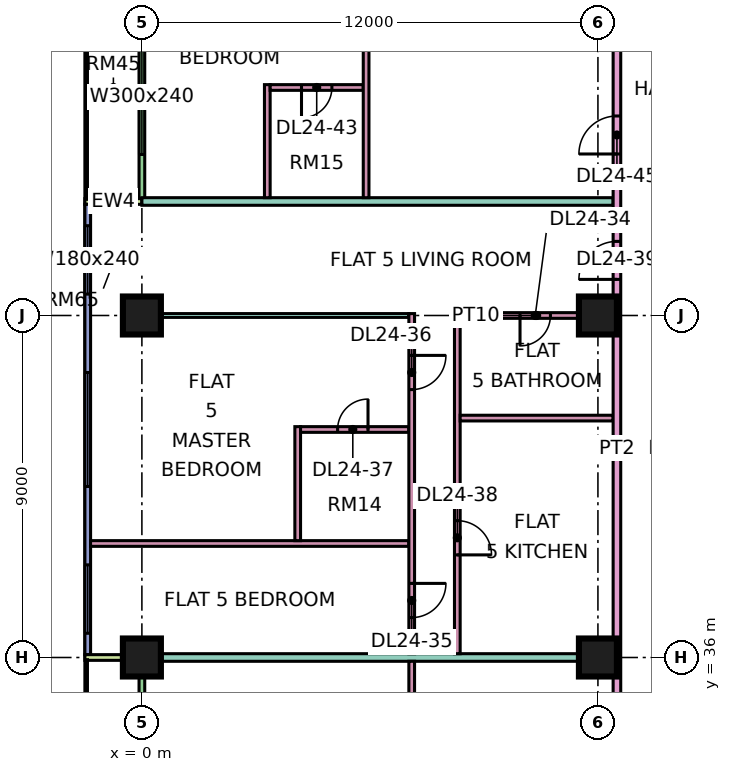
"""IFC4 building model, lengths in metres.
Left out: names, types, materials, properties, quantities, classifications, styles, units other than length and angle.
Written with IfcOpenShell. Run it as: python <this file> out.ifc"""

import sys

from ifc_helpers import new_model, si_unit, direction, frame, frame_2d, origin, origin_2d, place, context, subcontext, project, spatial, rectangle, extrude, element, fill, save


model = new_model("IFC4")
c1 = context("Model", 3, precision=1e-05, world=origin(), true_north=direction((0.0, 1.0)))
c2 = subcontext(c1, "Body", "Model", "MODEL_VIEW")
j1 = project(units=[si_unit("LENGTHUNIT", "METRE"), si_unit("PLANEANGLEUNIT", "RADIAN")], contexts=[c1])
p1 = place(None, origin())
s1 = spatial("IfcSite", under=j1, at=p1, CompositionType="ELEMENT")
p2 = place(p1, origin())
s2 = spatial("IfcBuilding", under=s1, at=p2, CompositionType="ELEMENT")
p3 = place(p2, frame((0.0, 0.0, 106.9)))
s3 = spatial("IfcBuildingStorey", under=s2, at=p3, CompositionType="ELEMENT", Elevation=106.9)
p4 = place(p3, frame((0.0, 36.0, 0.0), z_axis=(0.0, 0.0, 1.0), x_axis=(1.0, 0.0, 0.0)))
e1 = element("IfcColumn", 1, at=p4, inside=s3, PredefinedType="COLUMN", context=c2, shape_type="SweptSolid", body=[
    extrude(rectangle(XDim=1.0, YDim=1.0, at=origin_2d()), origin(), (0.0, 0.0, 1.0), 3.75),
])
p5 = place(p3, frame((0.0, 45.0, 0.0), z_axis=(0.0, 0.0, 1.0), x_axis=(1.0, 0.0, 0.0)))
e2 = element("IfcColumn", 2, at=p5, inside=s3, PredefinedType="COLUMN", context=c2, shape_type="SweptSolid", body=[
    extrude(rectangle(XDim=1.0, YDim=1.0, at=origin_2d()), origin(), (0.0, 0.0, 1.0), 3.75),
])
for number, where, z_axis, x_axis in (
    (3, (12.0, 36.0, 0.0), (0.0, 0.0, 1.0), (1.0, 0.0, 0.0)),
    (4, (12.0, 45.0, 0.0), (0.0, 0.0, 1.0), (1.0, 0.0, 0.0)),
):
    element("IfcColumn", number, at=place(p3, frame(where, z_axis=z_axis, x_axis=x_axis)), inside=s3, PredefinedType="COLUMN", context=c2, shape_type="SweptSolid", body=[
        extrude(rectangle(XDim=1.0, YDim=1.0, at=origin_2d()), origin(), (0.0, 0.0, 1.0), 3.75),
    ])
p6 = place(p3, frame((0.0, 61.425, 0.0), z_axis=(0.0, 0.0, 1.0), x_axis=(0.0, -1.0, 0.0)))
e5 = element("IfcWall", 5, at=p6, inside=s3, PredefinedType="SOLIDWALL", context=c2, shape_type="SweptSolid", body=[
    extrude(rectangle(XDim=13.35, YDim=0.15, at=frame_2d((6.675, 0.0))), origin(), (0.0, 0.0, 1.0), 3.35),
])
p7 = place(p6, frame((0.262, 0.0, 0.45)))
e6 = element("IfcOpeningElement", 6, at=p7, cuts=e5, PredefinedType="OPENING", context=c2, shape_type="SweptSolid", body=[
    extrude(rectangle(XDim=0.9, YDim=2.4, at=frame_2d((0.45, 1.2))), frame((0.0, 0.085, 0.0), z_axis=(0.0, -1.0, 0.0), x_axis=(1.0, 0.0, 0.0)), (0.0, 0.0, 1.0), 0.17),
])
p8 = place(p6, frame((3.225, 0.0, 0.0)))
e7 = element("IfcOpeningElement", 7, at=p8, cuts=e5, PredefinedType="OPENING", context=c2, shape_type="SweptSolid", body=[
    extrude(rectangle(XDim=1.8, YDim=2.4, at=frame_2d((0.9, 1.2))), frame((0.0, 0.085, 0.0), z_axis=(0.0, -1.0, 0.0), x_axis=(1.0, 0.0, 0.0)), (0.0, 0.0, 1.0), 0.17),
])
p9 = place(p6, frame((9.188, 0.0, 0.45)))
e8 = element("IfcOpeningElement", 8, at=p9, cuts=e5, PredefinedType="OPENING", context=c2, shape_type="SweptSolid", body=[
    extrude(rectangle(XDim=3.0, YDim=2.4, at=frame_2d((1.5, 1.2))), frame((0.0, 0.085, 0.0), z_axis=(0.0, -1.0, 0.0), x_axis=(1.0, 0.0, 0.0)), (0.0, 0.0, 1.0), 0.17),
])
p10 = place(p3, frame((-1.5, 48.0, 0.0), z_axis=(0.0, 0.0, 1.0), x_axis=(1.0, 0.0, 0.0)))
e9 = element("IfcWall", 9, at=p10, inside=s3, PredefinedType="SOLIDWALL", context=c2, shape_type="SweptSolid", body=[
    extrude(rectangle(XDim=1.5, YDim=0.15, at=frame_2d((0.75, 0.0))), origin(), (0.0, 0.0, 1.0), 3.35),
])
p11 = place(p3, frame((-1.425, 47.925, 0.0), z_axis=(0.0, 0.0, 1.0), x_axis=(0.0, -1.0, 0.0)))
e10 = element("IfcWall", 10, at=p11, inside=s3, PredefinedType="SOLIDWALL", context=c2, shape_type="SweptSolid", body=[
    extrude(rectangle(XDim=11.85, YDim=0.15, at=frame_2d((5.925, 0.0))), origin(), (0.0, 0.0, 1.0), 3.35),
])
p12 = place(p11, frame((0.562, 0.0, 0.45)))
e11 = element("IfcOpeningElement", 11, at=p12, cuts=e10, PredefinedType="OPENING", context=c2, shape_type="SweptSolid", body=[
    extrude(rectangle(XDim=1.8, YDim=2.4, at=frame_2d((0.9, 1.2))), frame((0.0, 0.085, 0.0), z_axis=(0.0, -1.0, 0.0), x_axis=(1.0, 0.0, 0.0)), (0.0, 0.0, 1.0), 0.17),
])
p13 = place(p11, frame((4.425, 0.0, 0.45)))
e12 = element("IfcOpeningElement", 12, at=p13, cuts=e10, PredefinedType="OPENING", context=c2, shape_type="SweptSolid", body=[
    extrude(rectangle(XDim=3.0, YDim=2.4, at=frame_2d((1.5, 1.2))), frame((0.0, 0.085, 0.0), z_axis=(0.0, -1.0, 0.0), x_axis=(1.0, 0.0, 0.0)), (0.0, 0.0, 1.0), 0.17),
])
p14 = place(p11, frame((9.488, 0.0, 0.45)))
e13 = element("IfcOpeningElement", 13, at=p14, cuts=e10, PredefinedType="OPENING", context=c2, shape_type="SweptSolid", body=[
    extrude(rectangle(XDim=1.8, YDim=2.4, at=frame_2d((0.9, 1.2))), frame((0.0, 0.085, 0.0), z_axis=(0.0, -1.0, 0.0), x_axis=(1.0, 0.0, 0.0)), (0.0, 0.0, 1.0), 0.17),
])
p15 = place(p3, frame((0.0, 35.925, 0.0), z_axis=(0.0, 0.0, 1.0), x_axis=(0.0, -1.0, 0.0)))
e14 = element("IfcWall", 14, at=p15, inside=s3, PredefinedType="SOLIDWALL", context=c2, shape_type="SweptSolid", body=[
    extrude(rectangle(XDim=11.85, YDim=0.15, at=frame_2d((5.925, 0.0))), origin(), (0.0, 0.0, 1.0), 3.35),
])
p16 = place(p15, frame((2.325, 0.0, 0.0)))
e15 = element("IfcOpeningElement", 15, at=p16, cuts=e14, PredefinedType="OPENING", context=c2, shape_type="SweptSolid", body=[
    extrude(rectangle(XDim=1.8, YDim=2.4, at=frame_2d((0.9, 1.2))), frame((0.0, 0.085, 0.0), z_axis=(0.0, -1.0, 0.0), x_axis=(1.0, 0.0, 0.0)), (0.0, 0.0, 1.0), 0.17),
])
p17 = place(p15, frame((7.125, 0.0, 0.45)))
e16 = element("IfcOpeningElement", 16, at=p17, cuts=e14, PredefinedType="OPENING", context=c2, shape_type="SweptSolid", body=[
    extrude(rectangle(XDim=3.0, YDim=2.4, at=frame_2d((1.5, 1.2))), frame((0.0, 0.085, 0.0), z_axis=(0.0, -1.0, 0.0), x_axis=(1.0, 0.0, 0.0)), (0.0, 0.0, 1.0), 0.17),
])
p18 = place(p3, frame((-1.5, 36.0, 0.0), z_axis=(0.0, 0.0, 1.0), x_axis=(1.0, 0.0, 0.0)))
e17 = element("IfcWall", 17, at=p18, inside=s3, PredefinedType="SOLIDWALL", context=c2, shape_type="SweptSolid", body=[
    extrude(rectangle(XDim=1.5, YDim=0.15, at=frame_2d((0.75, 0.0))), origin(), (0.0, 0.0, 1.0), 3.35),
])
p19 = place(p3, frame((-1.351, 39.0, 0.0), z_axis=(0.0, 0.0, 1.0), x_axis=(1.0, 0.0, 0.0)))
e18 = element("IfcWall", 18, at=p19, inside=s3, PredefinedType="PARTITIONING", context=c2, shape_type="SweptSolid", body=[
    extrude(rectangle(XDim=8.376, YDim=0.15, at=frame_2d((4.188, 0.0))), origin(), (0.0, 0.0, 1.0), 3.35),
])
e19 = element("IfcWall", 19, at=p4, inside=s3, PredefinedType="PARTITIONING", context=c2, shape_type="SweptSolid", body=[
    extrude(rectangle(XDim=12.4, YDim=0.2, at=frame_2d((6.2, 0.0))), origin(), (0.0, 0.0, 1.0), 3.35),
])
e20 = element("IfcWall", 20, at=p5, inside=s3, PredefinedType="PARTITIONING", context=c2, shape_type="SweptSolid", body=[
    extrude(rectangle(XDim=7.025, YDim=0.1, at=frame_2d((3.512, 0.0))), origin(), (0.0, 0.0, 1.0), 3.35),
])
p20 = place(p3, frame((0.0, 48.0, 0.0), z_axis=(0.0, 0.0, 1.0), x_axis=(1.0, 0.0, 0.0)))
e21 = element("IfcWall", 21, at=p20, inside=s3, PredefinedType="PARTITIONING", context=c2, shape_type="SweptSolid", body=[
    extrude(rectangle(XDim=12.4, YDim=0.2, at=frame_2d((6.2, 0.0))), origin(), (0.0, 0.0, 1.0), 3.35),
])
p21 = place(p3, frame((3.3, 48.1, 0.0), z_axis=(0.0, 0.0, 1.0), x_axis=(0.0, 1.0, 0.0)))
e22 = element("IfcWall", 22, at=p21, inside=s3, PredefinedType="PARTITIONING", context=c2, shape_type="SweptSolid", body=[
    extrude(rectangle(XDim=2.975, YDim=0.15, at=frame_2d((1.487, 0.0))), origin(), (0.0, 0.0, 1.0), 3.35),
])
p22 = place(p3, frame((3.375, 51.0, 0.0), z_axis=(0.0, 0.0, 1.0), x_axis=(1.0, 0.0, 0.0)))
e23 = element("IfcWall", 23, at=p22, inside=s3, PredefinedType="PARTITIONING", context=c2, shape_type="SweptSolid", body=[
    extrude(rectangle(XDim=2.45, YDim=0.15, at=frame_2d((1.225, 0.0))), origin(), (0.0, 0.0, 1.0), 3.35),
])
p23 = place(p22, frame((0.825, 0.0, 0.0)))
e24 = element("IfcOpeningElement", 24, at=p23, cuts=e23, PredefinedType="OPENING", context=c2, shape_type="SweptSolid", body=[
    extrude(rectangle(XDim=0.8, YDim=2.1, at=frame_2d((0.4, 1.05))), frame((0.0, 0.085, 0.0), z_axis=(0.0, -1.0, 0.0), x_axis=(1.0, 0.0, 0.0)), (0.0, 0.0, 1.0), 0.17),
])
p24 = place(p3, frame((4.1, 39.075, 0.0), z_axis=(0.0, 0.0, 1.0), x_axis=(0.0, 1.0, 0.0)))
e25 = element("IfcWall", 25, at=p24, inside=s3, PredefinedType="PARTITIONING", context=c2, shape_type="SweptSolid", body=[
    extrude(rectangle(XDim=3.0, YDim=0.15, at=frame_2d((1.5, 0.0))), origin(), (0.0, 0.0, 1.0), 3.35),
])
p25 = place(p3, frame((4.175, 42.0, 0.0), z_axis=(0.0, 0.0, 1.0), x_axis=(1.0, 0.0, 0.0)))
e26 = element("IfcWall", 26, at=p25, inside=s3, PredefinedType="PARTITIONING", context=c2, shape_type="SweptSolid", body=[
    extrude(rectangle(XDim=2.85, YDim=0.15, at=frame_2d((1.425, 0.0))), origin(), (0.0, 0.0, 1.0), 3.35),
])
p26 = place(p25, frame((0.975, 0.0, 0.0)))
e27 = element("IfcOpeningElement", 27, at=p26, cuts=e26, PredefinedType="OPENING", context=c2, shape_type="SweptSolid", body=[
    extrude(rectangle(XDim=0.8, YDim=2.1, at=frame_2d((0.4, 1.05))), frame((0.0, 0.085, 0.0), z_axis=(0.0, -1.0, 0.0), x_axis=(1.0, 0.0, 0.0)), (0.0, 0.0, 1.0), 0.17),
])
p27 = place(p3, frame((5.9, 48.1, 0.0), z_axis=(0.0, 0.0, 1.0), x_axis=(0.0, 1.0, 0.0)))
e28 = element("IfcWall", 28, at=p27, inside=s3, PredefinedType="PARTITIONING", context=c2, shape_type="SweptSolid", body=[
    extrude(rectangle(XDim=5.95, YDim=0.15, at=frame_2d((2.975, 0.0))), origin(), (0.0, 0.0, 1.0), 3.35),
])
p28 = place(p27, frame((3.95, 0.0, 0.0)))
e29 = element("IfcOpeningElement", 29, at=p28, cuts=e28, PredefinedType="OPENING", context=c2, shape_type="SweptSolid", body=[
    extrude(rectangle(XDim=0.9, YDim=2.1, at=frame_2d((0.45, 1.05))), frame((0.0, 0.085, 0.0), z_axis=(0.0, -1.0, 0.0), x_axis=(1.0, 0.0, 0.0)), (0.0, 0.0, 1.0), 0.17),
])
p29 = place(p3, frame((7.1, 26.925, 0.0), z_axis=(0.0, 0.0, 1.0), x_axis=(0.0, 1.0, 0.0)))
e30 = element("IfcWall", 30, at=p29, inside=s3, PredefinedType="PARTITIONING", context=c2, shape_type="SweptSolid", body=[
    extrude(rectangle(XDim=8.975, YDim=0.15, at=frame_2d((4.487, 0.0))), origin(), (0.0, 0.0, 1.0), 3.35),
])
p30 = place(p29, frame((1.125, 0.0, 0.0)))
e31 = element("IfcOpeningElement", 31, at=p30, cuts=e30, PredefinedType="OPENING", context=c2, shape_type="SweptSolid", body=[
    extrude(rectangle(XDim=0.8, YDim=2.1, at=frame_2d((0.4, 1.05))), frame((0.0, 0.085, 0.0), z_axis=(0.0, -1.0, 0.0), x_axis=(1.0, 0.0, 0.0)), (0.0, 0.0, 1.0), 0.17),
])
p31 = place(p29, frame((5.625, 0.0, 0.0)))
e32 = element("IfcOpeningElement", 32, at=p31, cuts=e30, PredefinedType="OPENING", context=c2, shape_type="SweptSolid", body=[
    extrude(rectangle(XDim=0.9, YDim=2.1, at=frame_2d((0.45, 1.05))), frame((0.0, 0.085, 0.0), z_axis=(0.0, -1.0, 0.0), x_axis=(1.0, 0.0, 0.0)), (0.0, 0.0, 1.0), 0.17),
])
p32 = place(p3, frame((7.1, 36.1, 0.0), z_axis=(0.0, 0.0, 1.0), x_axis=(0.0, 1.0, 0.0)))
e33 = element("IfcWall", 33, at=p32, inside=s3, PredefinedType="PARTITIONING", context=c2, shape_type="SweptSolid", body=[
    extrude(rectangle(XDim=8.95, YDim=0.15, at=frame_2d((4.475, 0.0))), origin(), (0.0, 0.0, 1.0), 3.35),
])
p33 = place(p32, frame((0.95, 0.0, 0.0)))
e34 = element("IfcOpeningElement", 34, at=p33, cuts=e33, PredefinedType="OPENING", context=c2, shape_type="SweptSolid", body=[
    extrude(rectangle(XDim=0.9, YDim=2.1, at=frame_2d((0.45, 1.05))), frame((0.0, 0.085, 0.0), z_axis=(0.0, -1.0, 0.0), x_axis=(1.0, 0.0, 0.0)), (0.0, 0.0, 1.0), 0.17),
])
p34 = place(p32, frame((6.95, 0.0, 0.0)))
e35 = element("IfcOpeningElement", 35, at=p34, cuts=e33, PredefinedType="OPENING", context=c2, shape_type="SweptSolid", body=[
    extrude(rectangle(XDim=0.9, YDim=2.1, at=frame_2d((0.45, 1.05))), frame((0.0, 0.085, 0.0), z_axis=(0.0, -1.0, 0.0), x_axis=(1.0, 0.0, 0.0)), (0.0, 0.0, 1.0), 0.17),
])
p35 = place(p3, frame((8.3, 36.1, 0.0), z_axis=(0.0, 0.0, 1.0), x_axis=(0.0, 1.0, 0.0)))
e36 = element("IfcWall", 36, at=p35, inside=s3, PredefinedType="PARTITIONING", context=c2, shape_type="SweptSolid", body=[
    extrude(rectangle(XDim=8.975, YDim=0.15, at=frame_2d((4.487, 0.0))), origin(), (0.0, 0.0, 1.0), 3.35),
])
p36 = place(p35, frame((2.6, 0.0, 0.0)))
e37 = element("IfcOpeningElement", 37, at=p36, cuts=e36, PredefinedType="OPENING", context=c2, shape_type="SweptSolid", body=[
    extrude(rectangle(XDim=0.9, YDim=2.1, at=frame_2d((0.45, 1.05))), frame((0.0, 0.085, 0.0), z_axis=(0.0, -1.0, 0.0), x_axis=(1.0, 0.0, 0.0)), (0.0, 0.0, 1.0), 0.17),
])
p37 = place(p3, frame((8.375, 42.3, 0.0), z_axis=(0.0, 0.0, 1.0), x_axis=(1.0, 0.0, 0.0)))
e38 = element("IfcWall", 38, at=p37, inside=s3, PredefinedType="PARTITIONING", context=c2, shape_type="SweptSolid", body=[
    extrude(rectangle(XDim=4.025, YDim=0.15, at=frame_2d((2.012, 0.0))), origin(), (0.0, 0.0, 1.0), 3.35),
])
p38 = place(p3, frame((8.375, 45.0, 0.0), z_axis=(0.0, 0.0, 1.0), x_axis=(1.0, 0.0, 0.0)))
e39 = element("IfcWall", 39, at=p38, inside=s3, PredefinedType="PARTITIONING", context=c2, shape_type="SweptSolid", body=[
    extrude(rectangle(XDim=4.025, YDim=0.15, at=frame_2d((2.012, 0.0))), origin(), (0.0, 0.0, 1.0), 3.35),
])
p39 = place(p38, frame((1.575, 0.0, 0.0)))
e40 = element("IfcOpeningElement", 40, at=p39, cuts=e39, PredefinedType="OPENING", context=c2, shape_type="SweptSolid", body=[
    extrude(rectangle(XDim=0.8, YDim=2.1, at=frame_2d((0.4, 1.05))), frame((0.0, 0.085, 0.0), z_axis=(0.0, -1.0, 0.0), x_axis=(1.0, 0.0, 0.0)), (0.0, 0.0, 1.0), 0.17),
])
p40 = place(p3, frame((12.5, 20.0, 0.0), z_axis=(0.0, 0.0, 1.0), x_axis=(0.0, 1.0, 0.0)))
e41 = element("IfcWall", 41, at=p40, inside=s3, PredefinedType="PARTITIONING", context=c2, shape_type="SweptSolid", body=[
    extrude(rectangle(XDim=43.0, YDim=0.2, at=frame_2d((21.5, 0.0))), origin(), (0.0, 0.0, 1.0), 3.35),
])
p41 = place(p40, frame((25.95, 0.0, 0.0)))
e42 = element("IfcOpeningElement", 42, at=p41, cuts=e41, PredefinedType="OPENING", context=c2, shape_type="SweptSolid", body=[
    extrude(rectangle(XDim=1.0, YDim=2.1, at=frame_2d((0.5, 1.05))), frame((0.0, 0.11, 0.0), z_axis=(0.0, -1.0, 0.0), x_axis=(1.0, 0.0, 0.0)), (0.0, 0.0, 1.0), 0.22),
])
p42 = place(p40, frame((29.25, 0.0, 0.0)))
e43 = element("IfcOpeningElement", 43, at=p42, cuts=e41, PredefinedType="OPENING", context=c2, shape_type="SweptSolid", body=[
    extrude(rectangle(XDim=1.0, YDim=2.1, at=frame_2d((0.5, 1.05))), frame((0.0, 0.11, 0.0), z_axis=(0.0, -1.0, 0.0), x_axis=(1.0, 0.0, 0.0)), (0.0, 0.0, 1.0), 0.22),
])
p43 = place(p40, frame((0.6, 0.0, 0.0)))
e44 = element("IfcOpeningElement", 44, at=p43, cuts=e41, PredefinedType="OPENING", context=c2, shape_type="SweptSolid", body=[
    extrude(rectangle(XDim=1.2, YDim=2.1, at=frame_2d((0.6, 1.05))), frame((0.0, 0.11, 0.0), z_axis=(0.0, -1.0, 0.0), x_axis=(1.0, 0.0, 0.0)), (0.0, 0.0, 1.0), 0.22),
])
p44 = place(p40, frame((4.65, 0.0, 0.0)))
e45 = element("IfcOpeningElement", 45, at=p44, cuts=e41, PredefinedType="OPENING", context=c2, shape_type="SweptSolid", body=[
    extrude(rectangle(XDim=1.0, YDim=2.1, at=frame_2d((0.5, 1.05))), frame((0.0, 0.11, 0.0), z_axis=(0.0, -1.0, 0.0), x_axis=(1.0, 0.0, 0.0)), (0.0, 0.0, 1.0), 0.22),
])
p45 = place(p9, origin())
e46 = element("IfcWindow", 46, at=p45, inside=s3, PartitioningType="SINGLE_PANEL", PredefinedType="WINDOW", context=c2, shape_type="SweptSolid", body=[
    extrude(rectangle(XDim=3.0, YDim=2.4, at=frame_2d((1.5, 1.2))), frame((0.0, 0.03, 0.0), z_axis=(0.0, -1.0, 0.0), x_axis=(1.0, 0.0, 0.0)), (0.0, 0.0, 1.0), 0.06),
])
fill(e8, e46)
p46 = place(p12, origin())
e47 = element("IfcWindow", 47, at=p46, inside=s3, PartitioningType="SINGLE_PANEL", PredefinedType="WINDOW", context=c2, shape_type="SweptSolid", body=[
    extrude(rectangle(XDim=1.8, YDim=2.4, at=frame_2d((0.9, 1.2))), frame((0.0, 0.03, 0.0), z_axis=(0.0, -1.0, 0.0), x_axis=(1.0, 0.0, 0.0)), (0.0, 0.0, 1.0), 0.06),
])
fill(e11, e47)
p47 = place(p13, origin())
e48 = element("IfcWindow", 48, at=p47, inside=s3, PartitioningType="SINGLE_PANEL", PredefinedType="WINDOW", context=c2, shape_type="SweptSolid", body=[
    extrude(rectangle(XDim=3.0, YDim=2.4, at=frame_2d((1.5, 1.2))), frame((0.0, 0.03, 0.0), z_axis=(0.0, -1.0, 0.0), x_axis=(1.0, 0.0, 0.0)), (0.0, 0.0, 1.0), 0.06),
])
fill(e12, e48)
p48 = place(p14, origin())
e49 = element("IfcWindow", 49, at=p48, inside=s3, PartitioningType="SINGLE_PANEL", PredefinedType="WINDOW", context=c2, shape_type="SweptSolid", body=[
    extrude(rectangle(XDim=1.8, YDim=2.4, at=frame_2d((0.9, 1.2))), frame((0.0, 0.03, 0.0), z_axis=(0.0, -1.0, 0.0), x_axis=(1.0, 0.0, 0.0)), (0.0, 0.0, 1.0), 0.06),
])
fill(e13, e49)
p49 = place(p39, frame((0.8, 0.0, 0.0), z_axis=(0.0, 0.0, 1.0), x_axis=(-1.0, 0.0, 0.0)))
e50 = element("IfcDoor", 50, at=p49, inside=s3, OperationType="SINGLE_SWING_LEFT", PredefinedType="DOOR", context=c2, shape_type="SweptSolid", body=[
    extrude(rectangle(XDim=0.8, YDim=2.1, at=frame_2d((0.4, 1.05))), frame((0.0, 0.025, 0.0), z_axis=(0.0, -1.0, 0.0), x_axis=(1.0, 0.0, 0.0)), (0.0, 0.0, 1.0), 0.05),
])
fill(e40, e50)
p50 = place(p33, origin())
e51 = element("IfcDoor", 51, at=p50, inside=s3, OperationType="SINGLE_SWING_RIGHT", PredefinedType="DOOR", context=c2, shape_type="SweptSolid", body=[
    extrude(rectangle(XDim=0.9, YDim=2.1, at=frame_2d((0.45, 1.05))), frame((0.0, 0.025, 0.0), z_axis=(0.0, -1.0, 0.0), x_axis=(1.0, 0.0, 0.0)), (0.0, 0.0, 1.0), 0.05),
])
fill(e34, e51)
p51 = place(p34, origin())
e52 = element("IfcDoor", 52, at=p51, inside=s3, OperationType="SINGLE_SWING_RIGHT", PredefinedType="DOOR", context=c2, shape_type="SweptSolid", body=[
    extrude(rectangle(XDim=0.9, YDim=2.1, at=frame_2d((0.45, 1.05))), frame((0.0, 0.025, 0.0), z_axis=(0.0, -1.0, 0.0), x_axis=(1.0, 0.0, 0.0)), (0.0, 0.0, 1.0), 0.05),
])
fill(e35, e52)
p52 = place(p26, frame((0.8, 0.0, 0.0), z_axis=(0.0, 0.0, 1.0), x_axis=(-1.0, 0.0, 0.0)))
e53 = element("IfcDoor", 53, at=p52, inside=s3, OperationType="SINGLE_SWING_RIGHT", PredefinedType="DOOR", context=c2, shape_type="SweptSolid", body=[
    extrude(rectangle(XDim=0.8, YDim=2.1, at=frame_2d((0.4, 1.05))), frame((0.0, 0.025, 0.0), z_axis=(0.0, -1.0, 0.0), x_axis=(1.0, 0.0, 0.0)), (0.0, 0.0, 1.0), 0.05),
])
fill(e27, e53)
p53 = place(p36, frame((0.9, 0.0, 0.0), z_axis=(0.0, 0.0, 1.0), x_axis=(-1.0, 0.0, 0.0)))
e54 = element("IfcDoor", 54, at=p53, inside=s3, OperationType="SINGLE_SWING_LEFT", PredefinedType="DOOR", context=c2, shape_type="SweptSolid", body=[
    extrude(rectangle(XDim=0.9, YDim=2.1, at=frame_2d((0.45, 1.05))), frame((0.0, 0.025, 0.0), z_axis=(0.0, -1.0, 0.0), x_axis=(1.0, 0.0, 0.0)), (0.0, 0.0, 1.0), 0.05),
])
fill(e37, e54)
p54 = place(p41, origin())
e55 = element("IfcDoor", 55, at=p54, inside=s3, OperationType="SINGLE_SWING_LEFT", PredefinedType="DOOR", context=c2, shape_type="SweptSolid", body=[
    extrude(rectangle(XDim=1.0, YDim=2.1, at=frame_2d((0.5, 1.05))), frame((0.0, 0.025, 0.0), z_axis=(0.0, -1.0, 0.0), x_axis=(1.0, 0.0, 0.0)), (0.0, 0.0, 1.0), 0.05),
])
fill(e42, e55)
p55 = place(p23, frame((0.8, 0.0, 0.0), z_axis=(0.0, 0.0, 1.0), x_axis=(-1.0, 0.0, 0.0)))
e56 = element("IfcDoor", 56, at=p55, inside=s3, OperationType="SINGLE_SWING_LEFT", PredefinedType="DOOR", context=c2, shape_type="SweptSolid", body=[
    extrude(rectangle(XDim=0.8, YDim=2.1, at=frame_2d((0.4, 1.05))), frame((0.0, 0.025, 0.0), z_axis=(0.0, -1.0, 0.0), x_axis=(1.0, 0.0, 0.0)), (0.0, 0.0, 1.0), 0.05),
])
fill(e24, e56)
p56 = place(p42, origin())
e57 = element("IfcDoor", 57, at=p56, inside=s3, OperationType="SINGLE_SWING_LEFT", PredefinedType="DOOR", context=c2, shape_type="SweptSolid", body=[
    extrude(rectangle(XDim=1.0, YDim=2.1, at=frame_2d((0.5, 1.05))), frame((0.0, 0.025, 0.0), z_axis=(0.0, -1.0, 0.0), x_axis=(1.0, 0.0, 0.0)), (0.0, 0.0, 1.0), 0.05),
])
fill(e43, e57)
save(model, sys.argv[1])
